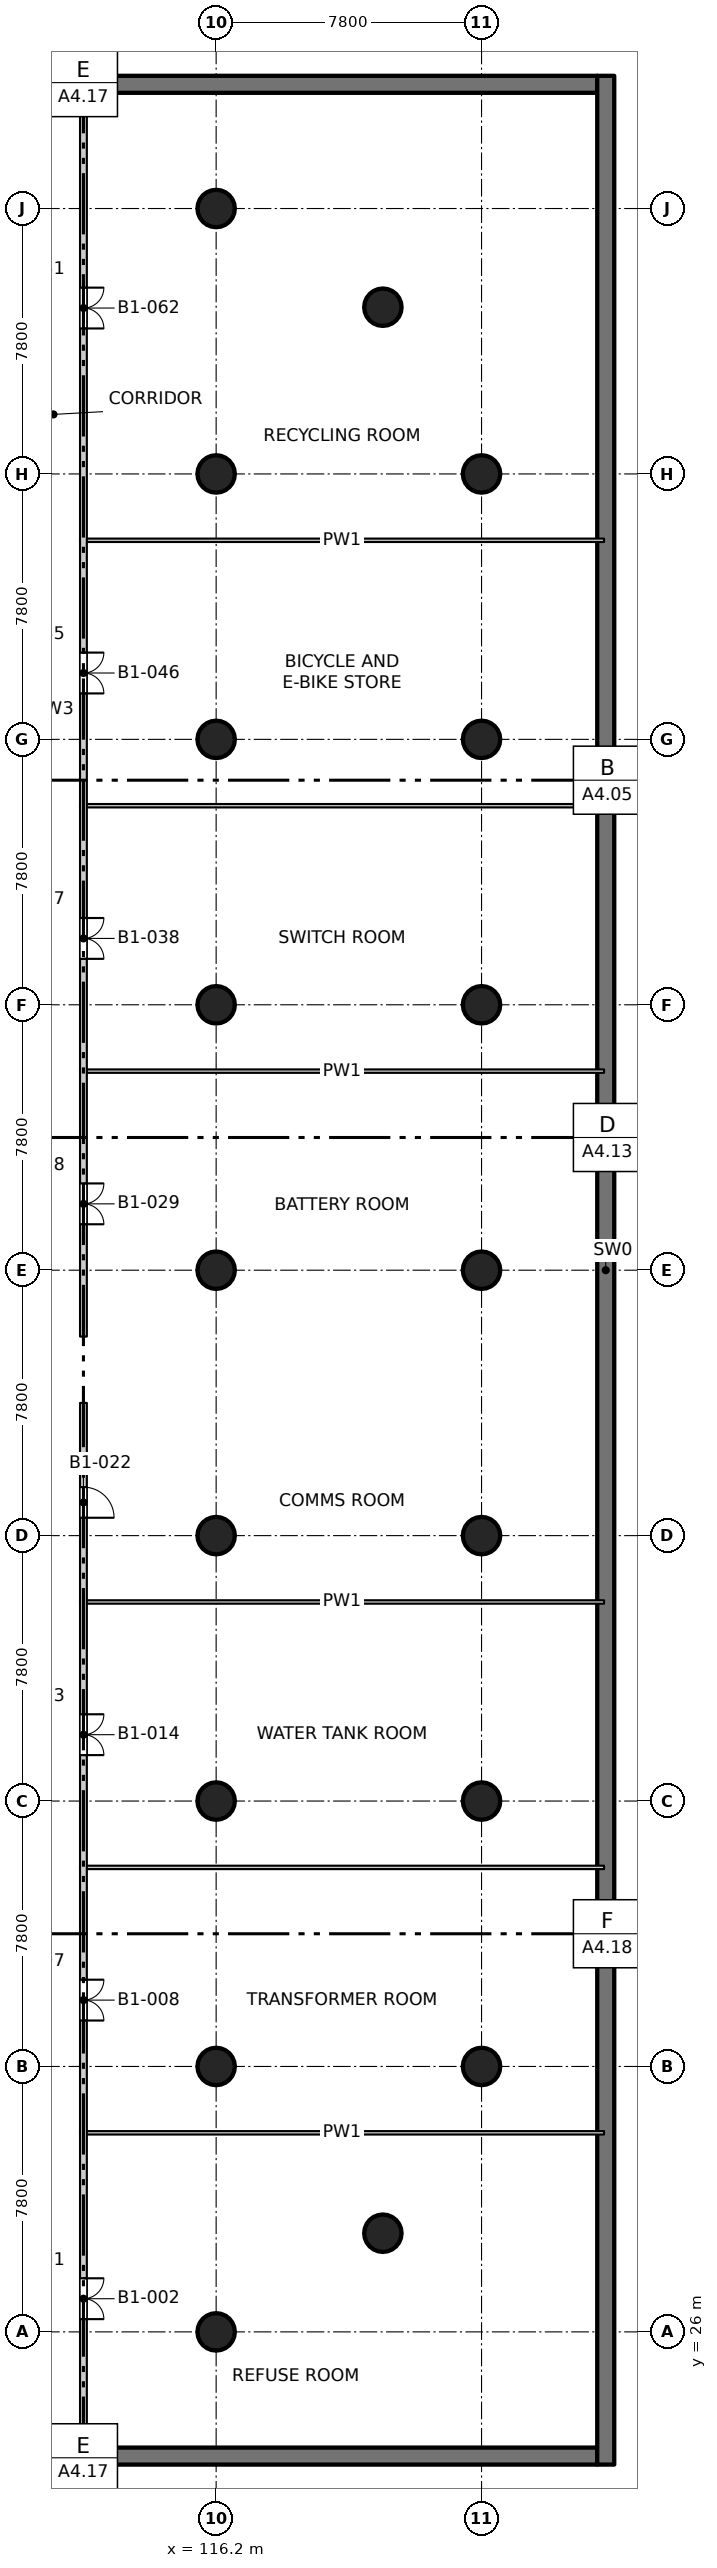
"""IFC4 building model, lengths in metres.
Left out: names, types, materials, properties, quantities, classifications, styles, units other than length and angle.
Written with IfcOpenShell. Run it as: python <this file> out.ifc"""

import sys

from ifc_helpers import new_model, si_unit, direction, frame, frame_2d, origin, origin_2d, place, context, subcontext, project, spatial, rectangle, circle, extrude, element, fill, save


model = new_model("IFC4")
c1 = context("Model", 3, precision=1e-05, world=origin(), true_north=direction((0.0, 1.0)))
c2 = subcontext(c1, "Body", "Model", "MODEL_VIEW")
j1 = project(units=[si_unit("LENGTHUNIT", "METRE"), si_unit("PLANEANGLEUNIT", "RADIAN")], contexts=[c1])
p1 = place(None, origin())
s1 = spatial("IfcSite", under=j1, at=p1, CompositionType="ELEMENT")
p2 = place(p1, origin())
s2 = spatial("IfcBuilding", under=s1, at=p2, CompositionType="ELEMENT")
p3 = place(p2, frame((0.0, 0.0, -4.5)))
s3 = spatial("IfcBuildingStorey", under=s2, at=p3, CompositionType="ELEMENT", Elevation=-4.5)
for number, where, z_axis, x_axis in (
    (1, (42.6, 22.35, -0.35), (0.0, 0.0, 1.0), (1.0, 0.0, 0.0)),
    (2, (42.6, 92.05, -0.35), (0.0, 0.0, 1.0), (1.0, 0.0, 0.0)),
):
    element("IfcWall", number, at=place(p3, frame(where, z_axis=z_axis, x_axis=x_axis)), inside=s3, PredefinedType="SOLIDWALL", context=c2, shape_type="SweptSolid", body=[
        extrude(rectangle(XDim=84.8, YDim=0.5, at=frame_2d((42.4, 0.0))), origin(), (0.0, 0.0, 1.0), 4.45),
    ])
p4 = place(p3, frame((127.65, 22.1, -0.35), z_axis=(0.0, 0.0, 1.0), x_axis=(0.0, 1.0, 0.0)))
e3 = element("IfcWall", 3, at=p4, inside=s3, PredefinedType="SOLIDWALL", context=c2, shape_type="SweptSolid", body=[
    extrude(rectangle(XDim=70.2, YDim=0.5, at=frame_2d((35.1, 0.0))), origin(), (0.0, 0.0, 1.0), 4.45),
])
for number, where, z_axis, x_axis in (
    (4, (116.2, 26.0, -0.35), (0.0, 0.0, 1.0), (1.0, 0.0, 0.0)),
    (5, (116.2, 33.8, -0.35), (0.0, 0.0, 1.0), (1.0, 0.0, 0.0)),
    (6, (116.2, 41.6, -0.35), (0.0, 0.0, 1.0), (1.0, 0.0, 0.0)),
    (7, (116.2, 49.4, -0.35), (0.0, 0.0, 1.0), (1.0, 0.0, 0.0)),
    (8, (116.2, 57.2, -0.35), (0.0, 0.0, 1.0), (1.0, 0.0, 0.0)),
    (9, (116.2, 65.0, -0.35), (0.0, 0.0, 1.0), (1.0, 0.0, 0.0)),
    (10, (116.2, 72.8, -0.35), (0.0, 0.0, 1.0), (1.0, 0.0, 0.0)),
    (11, (116.2, 80.6, -0.35), (0.0, 0.0, 1.0), (1.0, 0.0, 0.0)),
    (12, (116.2, 88.4, -0.35), (0.0, 0.0, 1.0), (1.0, 0.0, 0.0)),
    (13, (121.1, 28.9, -0.35), (0.0, 0.0, 1.0), (1.0, 0.0, 0.0)),
    (14, (124.0, 33.8, -0.35), (0.0, 0.0, 1.0), (1.0, 0.0, 0.0)),
    (15, (124.0, 41.6, -0.35), (0.0, 0.0, 1.0), (1.0, 0.0, 0.0)),
    (16, (124.0, 49.4, -0.35), (0.0, 0.0, 1.0), (1.0, 0.0, 0.0)),
    (17, (124.0, 57.2, -0.35), (0.0, 0.0, 1.0), (1.0, 0.0, 0.0)),
    (18, (124.0, 65.0, -0.35), (0.0, 0.0, 1.0), (1.0, 0.0, 0.0)),
    (19, (124.0, 72.8, -0.35), (0.0, 0.0, 1.0), (1.0, 0.0, 0.0)),
    (20, (124.0, 80.6, -0.35), (0.0, 0.0, 1.0), (1.0, 0.0, 0.0)),
    (21, (121.1, 85.5, -0.35), (0.0, 0.0, 1.0), (1.0, 0.0, 0.0)),
):
    element("IfcColumn", number, at=place(p3, frame(where, z_axis=z_axis, x_axis=x_axis)), inside=s3, PredefinedType="COLUMN", context=c2, shape_type="SweptSolid", body=[
        extrude(circle(Radius=0.55, at=origin_2d()), origin(), (0.0, 0.0, 1.0), 4.45),
    ])
for number, where, z_axis, x_axis in (
    (22, (112.2, 31.85, 0.0), (0.0, 0.0, 1.0), (1.0, 0.0, 0.0)),
    (23, (112.2, 39.65, 0.0), (0.0, 0.0, 1.0), (1.0, 0.0, 0.0)),
    (24, (112.2, 47.45, 0.0), (0.0, 0.0, 1.0), (1.0, 0.0, 0.0)),
    (25, (112.2, 63.05, 0.0), (0.0, 0.0, 1.0), (1.0, 0.0, 0.0)),
    (26, (112.2, 70.85, 0.0), (0.0, 0.0, 1.0), (1.0, 0.0, 0.0)),
    (27, (112.2, 78.65, 0.0), (0.0, 0.0, 1.0), (1.0, 0.0, 0.0)),
):
    element("IfcWall", number, at=place(p3, frame(where, z_axis=z_axis, x_axis=x_axis)), inside=s3, PredefinedType="PARTITIONING", context=c2, shape_type="SweptSolid", body=[
        extrude(rectangle(XDim=15.4, YDim=0.1, at=frame_2d((7.7, 0.0))), origin(), (0.0, 0.0, 1.0), 4.1),
    ])
p5 = place(p3, frame((112.3, 22.4, 0.0), z_axis=(0.0, 0.0, 1.0), x_axis=(0.0, 1.0, 0.0)))
e28 = element("IfcWall", 28, at=p5, inside=s3, PredefinedType="PARTITIONING", context=c2, shape_type="SweptSolid", body=[
    extrude(rectangle(XDim=30.9, YDim=0.2, at=frame_2d((15.45, 0.0))), origin(), (0.0, 0.0, 1.0), 4.1),
])
p6 = place(p5, frame((3.975, 0.0, 0.0)))
e29 = element("IfcOpeningElement", 29, at=p6, cuts=e28, PredefinedType="OPENING", context=c2, shape_type="SweptSolid", body=[
    extrude(rectangle(XDim=1.2, YDim=2.1, at=frame_2d((0.6, 1.05))), frame((0.0, 0.11, 0.0), z_axis=(0.0, -1.0, 0.0), x_axis=(1.0, 0.0, 0.0)), (0.0, 0.0, 1.0), 0.22),
])
p7 = place(p5, frame((12.75, 0.0, 0.0)))
e30 = element("IfcOpeningElement", 30, at=p7, cuts=e28, PredefinedType="OPENING", context=c2, shape_type="SweptSolid", body=[
    extrude(rectangle(XDim=1.2, YDim=2.1, at=frame_2d((0.6, 1.05))), frame((0.0, 0.11, 0.0), z_axis=(0.0, -1.0, 0.0), x_axis=(1.0, 0.0, 0.0)), (0.0, 0.0, 1.0), 0.22),
])
p8 = place(p5, frame((20.55, 0.0, 0.0)))
e31 = element("IfcOpeningElement", 31, at=p8, cuts=e28, PredefinedType="OPENING", context=c2, shape_type="SweptSolid", body=[
    extrude(rectangle(XDim=1.2, YDim=2.1, at=frame_2d((0.6, 1.05))), frame((0.0, 0.11, 0.0), z_axis=(0.0, -1.0, 0.0), x_axis=(1.0, 0.0, 0.0)), (0.0, 0.0, 1.0), 0.22),
])
p9 = place(p5, frame((27.525, 0.0, 0.0)))
e32 = element("IfcOpeningElement", 32, at=p9, cuts=e28, PredefinedType="OPENING", context=c2, shape_type="SweptSolid", body=[
    extrude(rectangle(XDim=0.9, YDim=2.1, at=frame_2d((0.45, 1.05))), frame((0.0, 0.11, 0.0), z_axis=(0.0, -1.0, 0.0), x_axis=(1.0, 0.0, 0.0)), (0.0, 0.0, 1.0), 0.22),
])
p10 = place(p3, frame((112.3, 55.25, 0.0), z_axis=(0.0, 0.0, 1.0), x_axis=(0.0, 1.0, 0.0)))
e33 = element("IfcWall", 33, at=p10, inside=s3, PredefinedType="PARTITIONING", context=c2, shape_type="SweptSolid", body=[
    extrude(rectangle(XDim=36.75, YDim=0.2, at=frame_2d((18.375, 0.0))), origin(), (0.0, 0.0, 1.0), 4.1),
])
p11 = place(p10, frame((3.3, 0.0, 0.0)))
e34 = element("IfcOpeningElement", 34, at=p11, cuts=e33, PredefinedType="OPENING", context=c2, shape_type="SweptSolid", body=[
    extrude(rectangle(XDim=1.2, YDim=2.1, at=frame_2d((0.6, 1.05))), frame((0.0, 0.11, 0.0), z_axis=(0.0, -1.0, 0.0), x_axis=(1.0, 0.0, 0.0)), (0.0, 0.0, 1.0), 0.22),
])
p12 = place(p10, frame((11.1, 0.0, 0.0)))
e35 = element("IfcOpeningElement", 35, at=p12, cuts=e33, PredefinedType="OPENING", context=c2, shape_type="SweptSolid", body=[
    extrude(rectangle(XDim=1.2, YDim=2.1, at=frame_2d((0.6, 1.05))), frame((0.0, 0.11, 0.0), z_axis=(0.0, -1.0, 0.0), x_axis=(1.0, 0.0, 0.0)), (0.0, 0.0, 1.0), 0.22),
])
p13 = place(p10, frame((18.9, 0.0, 0.0)))
e36 = element("IfcOpeningElement", 36, at=p13, cuts=e33, PredefinedType="OPENING", context=c2, shape_type="SweptSolid", body=[
    extrude(rectangle(XDim=1.2, YDim=2.1, at=frame_2d((0.6, 1.05))), frame((0.0, 0.11, 0.0), z_axis=(0.0, -1.0, 0.0), x_axis=(1.0, 0.0, 0.0)), (0.0, 0.0, 1.0), 0.22),
])
p14 = place(p10, frame((29.625, 0.0, 0.0)))
e37 = element("IfcOpeningElement", 37, at=p14, cuts=e33, PredefinedType="OPENING", context=c2, shape_type="SweptSolid", body=[
    extrude(rectangle(XDim=1.2, YDim=2.1, at=frame_2d((0.6, 1.05))), frame((0.0, 0.11, 0.0), z_axis=(0.0, -1.0, 0.0), x_axis=(1.0, 0.0, 0.0)), (0.0, 0.0, 1.0), 0.22),
])
p15 = place(p6, origin())
e38 = element("IfcDoor", 38, at=p15, inside=s3, OperationType="DOUBLE_DOOR_SINGLE_SWING", PredefinedType="DOOR", context=c2, shape_type="SweptSolid", body=[
    extrude(rectangle(XDim=1.2, YDim=2.1, at=frame_2d((0.6, 1.05))), frame((0.0, 0.025, 0.0), z_axis=(0.0, -1.0, 0.0), x_axis=(1.0, 0.0, 0.0)), (0.0, 0.0, 1.0), 0.05),
])
fill(e29, e38)
p16 = place(p7, origin())
e39 = element("IfcDoor", 39, at=p16, inside=s3, OperationType="DOUBLE_DOOR_SINGLE_SWING", PredefinedType="DOOR", context=c2, shape_type="SweptSolid", body=[
    extrude(rectangle(XDim=1.2, YDim=2.1, at=frame_2d((0.6, 1.05))), frame((0.0, 0.025, 0.0), z_axis=(0.0, -1.0, 0.0), x_axis=(1.0, 0.0, 0.0)), (0.0, 0.0, 1.0), 0.05),
])
fill(e30, e39)
p17 = place(p8, origin())
e40 = element("IfcDoor", 40, at=p17, inside=s3, OperationType="DOUBLE_DOOR_SINGLE_SWING", PredefinedType="DOOR", context=c2, shape_type="SweptSolid", body=[
    extrude(rectangle(XDim=1.2, YDim=2.1, at=frame_2d((0.6, 1.05))), frame((0.0, 0.025, 0.0), z_axis=(0.0, -1.0, 0.0), x_axis=(1.0, 0.0, 0.0)), (0.0, 0.0, 1.0), 0.05),
])
fill(e31, e40)
p18 = place(p9, origin())
e41 = element("IfcDoor", 41, at=p18, inside=s3, OperationType="SINGLE_SWING_RIGHT", PredefinedType="DOOR", context=c2, shape_type="SweptSolid", body=[
    extrude(rectangle(XDim=0.9, YDim=2.1, at=frame_2d((0.45, 1.05))), frame((0.0, 0.025, 0.0), z_axis=(0.0, -1.0, 0.0), x_axis=(1.0, 0.0, 0.0)), (0.0, 0.0, 1.0), 0.05),
])
fill(e32, e41)
p19 = place(p11, origin())
e42 = element("IfcDoor", 42, at=p19, inside=s3, OperationType="DOUBLE_DOOR_SINGLE_SWING", PredefinedType="DOOR", context=c2, shape_type="SweptSolid", body=[
    extrude(rectangle(XDim=1.2, YDim=2.1, at=frame_2d((0.6, 1.05))), frame((0.0, 0.025, 0.0), z_axis=(0.0, -1.0, 0.0), x_axis=(1.0, 0.0, 0.0)), (0.0, 0.0, 1.0), 0.05),
])
fill(e34, e42)
p20 = place(p12, origin())
e43 = element("IfcDoor", 43, at=p20, inside=s3, OperationType="DOUBLE_DOOR_SINGLE_SWING", PredefinedType="DOOR", context=c2, shape_type="SweptSolid", body=[
    extrude(rectangle(XDim=1.2, YDim=2.1, at=frame_2d((0.6, 1.05))), frame((0.0, 0.025, 0.0), z_axis=(0.0, -1.0, 0.0), x_axis=(1.0, 0.0, 0.0)), (0.0, 0.0, 1.0), 0.05),
])
fill(e35, e43)
p21 = place(p13, origin())
e44 = element("IfcDoor", 44, at=p21, inside=s3, OperationType="DOUBLE_DOOR_SINGLE_SWING", PredefinedType="DOOR", context=c2, shape_type="SweptSolid", body=[
    extrude(rectangle(XDim=1.2, YDim=2.1, at=frame_2d((0.6, 1.05))), frame((0.0, 0.025, 0.0), z_axis=(0.0, -1.0, 0.0), x_axis=(1.0, 0.0, 0.0)), (0.0, 0.0, 1.0), 0.05),
])
fill(e36, e44)
p22 = place(p14, origin())
e45 = element("IfcDoor", 45, at=p22, inside=s3, OperationType="DOUBLE_DOOR_SINGLE_SWING", PredefinedType="DOOR", context=c2, shape_type="SweptSolid", body=[
    extrude(rectangle(XDim=1.2, YDim=2.1, at=frame_2d((0.6, 1.05))), frame((0.0, 0.025, 0.0), z_axis=(0.0, -1.0, 0.0), x_axis=(1.0, 0.0, 0.0)), (0.0, 0.0, 1.0), 0.05),
])
fill(e37, e45)
save(model, sys.argv[1])
